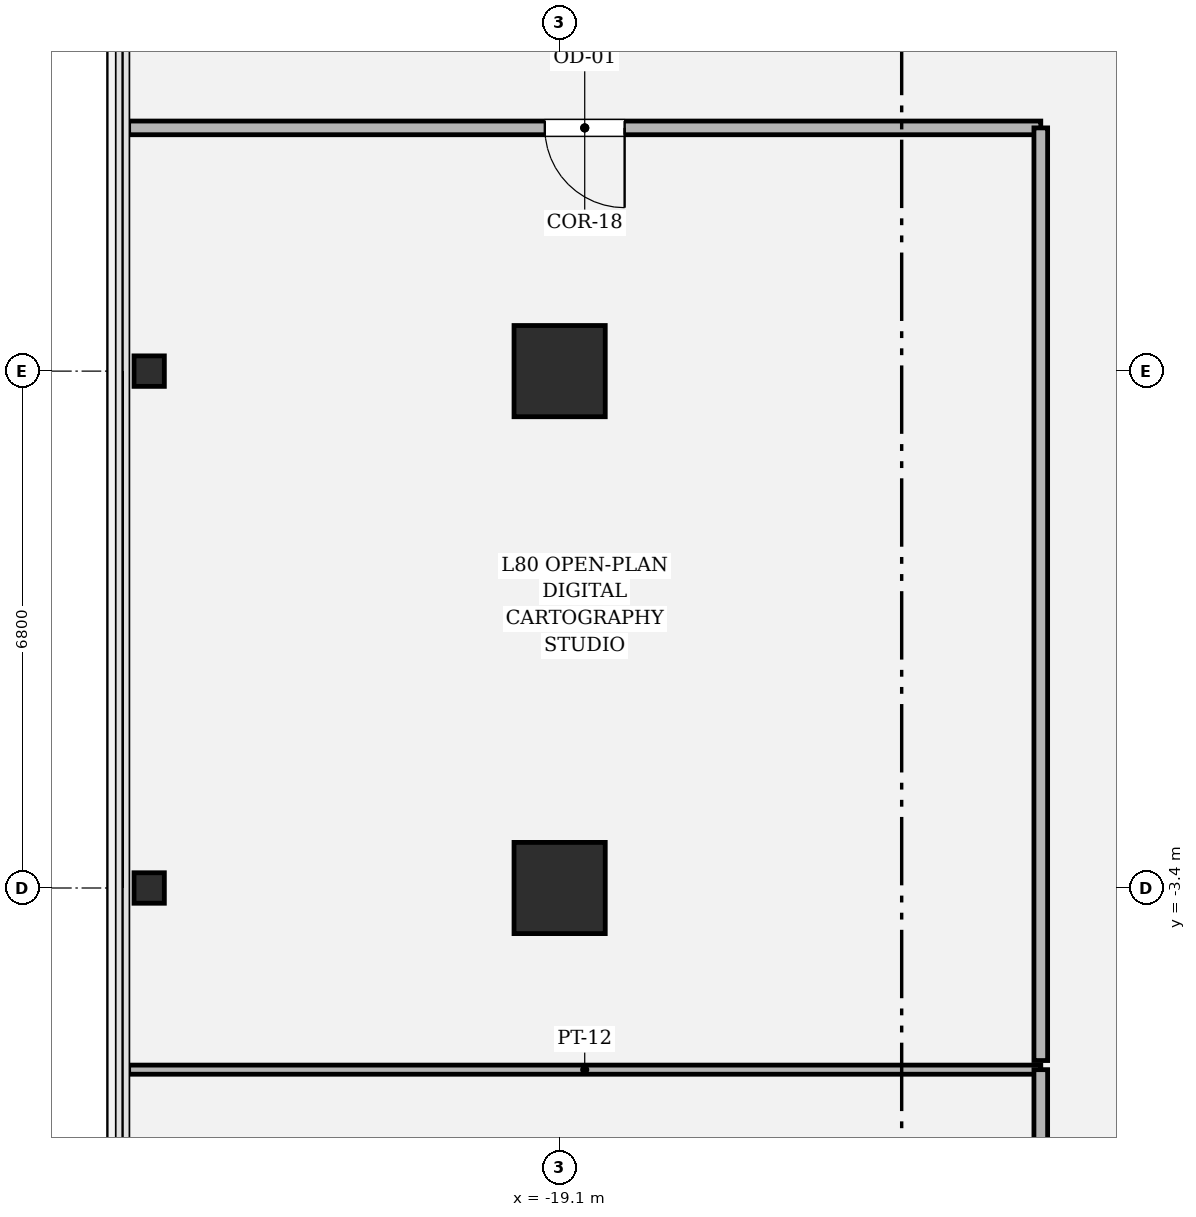
"""IFC4 building model, lengths in metres.
Left out: names, types, materials, properties, quantities, classifications, styles, units other than length and angle.
Written with IfcOpenShell. Run it as: python <this file> out.ifc"""

import sys

from ifc_helpers import new_model, si_unit, direction, frame, frame_2d, origin, origin_2d, place, context, subcontext, project, spatial, rectangle, hollow_rectangle, i_section, extrude, element, fill, save


model = new_model("IFC4")
c1 = context("Model", 3, precision=1e-05, world=origin(), true_north=direction((0.0, 1.0)))
c2 = subcontext(c1, "Body", "Model", "MODEL_VIEW")
j1 = project(units=[si_unit("LENGTHUNIT", "METRE"), si_unit("PLANEANGLEUNIT", "RADIAN")], contexts=[c1])
p1 = place(None, origin())
s1 = spatial("IfcSite", under=j1, at=p1, CompositionType="ELEMENT")
p2 = place(p1, origin())
s2 = spatial("IfcBuilding", under=s1, at=p2, CompositionType="ELEMENT")
p3 = place(p2, frame((0.0, 0.0, 339.0)))
s3 = spatial("IfcBuildingStorey", under=s2, at=p3, CompositionType="ELEMENT", Elevation=339.0)
for number, where, z_axis, x_axis in (
    (1, (-19.1, 3.4, 0.0), (0.0, 0.0, 1.0), (1.0, 0.0, 0.0)),
    (2, (-19.1, -3.4, 0.0), (0.0, 0.0, 1.0), (1.0, 0.0, 0.0)),
):
    element("IfcColumn", number, at=place(p3, frame(where, z_axis=z_axis, x_axis=x_axis)), inside=s3, PredefinedType="COLUMN", context=c2, shape_type="SweptSolid", body=[
        extrude(hollow_rectangle(XDim=1.2, YDim=1.2, WallThickness=0.035, at=origin_2d()), origin(), (0.0, 0.0, 1.0), 4.8),
    ])
for number, where, z_axis, x_axis in (
    (3, (-24.5, -3.4, 0.0), (0.0, 0.0, 1.0), (0.0, 1.0, 0.0)),
    (4, (-24.5, 3.4, 0.0), (0.0, 0.0, 1.0), (0.0, 1.0, 0.0)),
):
    element("IfcColumn", number, at=place(p3, frame(where, z_axis=z_axis, x_axis=x_axis)), inside=s3, PredefinedType="COLUMN", context=c2, shape_type="SweptSolid", body=[
        extrude(i_section(OverallWidth=0.401, OverallDepth=0.399, WebThickness=0.025, FlangeThickness=0.04, FilletRadius=0.018, at=origin_2d()), origin(), (0.0, 0.0, 1.0), 4.798),
    ])
p4 = place(p3, frame((-24.77, -5.79, 0.0), z_axis=(0.0, 0.0, 1.0), x_axis=(1.0, 0.0, 0.0)))
e5 = element("IfcWall", 5, at=p4, inside=s3, PredefinedType="PARTITIONING", context=c2, shape_type="SweptSolid", body=[
    extrude(rectangle(XDim=12.0, YDim=0.12, at=frame_2d((6.0, 0.0))), origin(), (0.0, 0.0, 1.0), 3.194),
])
p5 = place(p3, frame((-12.77, -5.79, 0.0), z_axis=(0.0, 0.0, 1.0), x_axis=(0.0, -1.0, 0.0)))
e6 = element("IfcWall", 6, at=p5, inside=s3, PredefinedType="PARTITIONING", context=c2, shape_type="SweptSolid", body=[
    extrude(rectangle(XDim=5.98, YDim=0.18, at=frame_2d((2.99, 0.0))), origin(), (0.0, 0.0, 1.0), 3.194),
])
p6 = place(p5, frame((2.465, 0.0, 0.0)))
e7 = element("IfcOpeningElement", 7, at=p6, cuts=e6, PredefinedType="OPENING", context=c2, shape_type="SweptSolid", body=[
    extrude(rectangle(XDim=1.05, YDim=2.2, at=frame_2d((0.525, 1.1))), frame((0.0, 0.1, 0.0), z_axis=(0.0, -1.0, 0.0), x_axis=(1.0, 0.0, 0.0)), (0.0, 0.0, 1.0), 0.2),
])
p7 = place(p3, frame((-24.77, 6.6, 0.0), z_axis=(0.0, 0.0, 1.0), x_axis=(1.0, 0.0, 0.0)))
e8 = element("IfcWall", 8, at=p7, inside=s3, PredefinedType="PARTITIONING", context=c2, shape_type="SweptSolid", body=[
    extrude(rectangle(XDim=12.0, YDim=0.18, at=frame_2d((6.0, 0.0))), origin(), (0.0, 0.0, 1.0), 3.194),
])
p8 = place(p7, frame((5.475, 0.0, 0.0)))
e9 = element("IfcOpeningElement", 9, at=p8, cuts=e8, PredefinedType="OPENING", context=c2, shape_type="SweptSolid", body=[
    extrude(rectangle(XDim=1.05, YDim=2.2, at=frame_2d((0.525, 1.1))), frame((0.0, 0.1, 0.0), z_axis=(0.0, -1.0, 0.0), x_axis=(1.0, 0.0, 0.0)), (0.0, 0.0, 1.0), 0.2),
])
p9 = place(p3, frame((-12.77, 6.6, 0.0), z_axis=(0.0, 0.0, 1.0), x_axis=(0.0, -1.0, 0.0)))
e10 = element("IfcWall", 10, at=p9, inside=s3, PredefinedType="PARTITIONING", context=c2, shape_type="SweptSolid", body=[
    extrude(rectangle(XDim=12.27, YDim=0.18, at=frame_2d((6.135, 0.0))), origin(), (0.0, 0.0, 1.0), 3.194),
])
p10 = place(p8, origin())
e11 = element("IfcDoor", 11, at=p10, inside=s3, OperationType="SINGLE_SWING_RIGHT", PredefinedType="DOOR", context=c2, shape_type="SweptSolid", body=[
    extrude(rectangle(XDim=1.05, YDim=2.2, at=frame_2d((0.525, 1.1))), frame((0.0, 0.025, 0.0), z_axis=(0.0, -1.0, 0.0), x_axis=(1.0, 0.0, 0.0)), (0.0, 0.0, 1.0), 0.05),
])
fill(e9, e11)
save(model, sys.argv[1])
